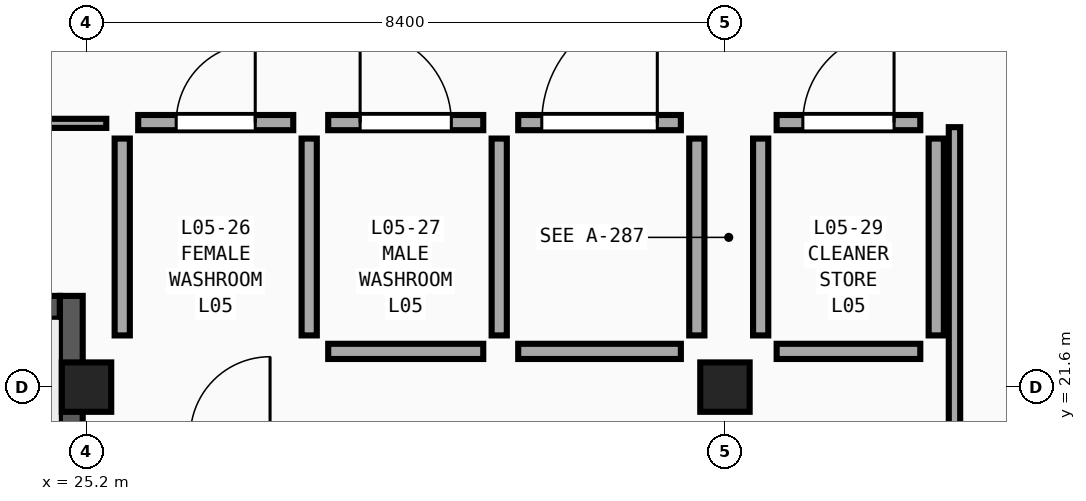
"""IFC4 building model, lengths in metres.
Left out: names, types, materials, properties, quantities, classifications, styles, units other than length and angle.
Written with IfcOpenShell. Run it as: python <this file> out.ifc"""

import sys

from ifc_helpers import new_model, si_unit, direction, frame, frame_2d, origin, origin_2d, place, context, subcontext, project, spatial, rectangle, extrude, element, fill, save


model = new_model("IFC4")
c1 = context("Model", 3, precision=1e-05, world=origin(), true_north=direction((0.0, 1.0)))
c2 = subcontext(c1, "Body", "Model", "MODEL_VIEW")
j1 = project(units=[si_unit("LENGTHUNIT", "METRE"), si_unit("PLANEANGLEUNIT", "RADIAN")], contexts=[c1])
p1 = place(None, origin())
s1 = spatial("IfcSite", under=j1, at=p1, CompositionType="ELEMENT")
p2 = place(p1, origin())
s2 = spatial("IfcBuilding", under=s1, at=p2, CompositionType="ELEMENT")
p3 = place(p2, frame((0.0, 0.0, 23.4)))
s3 = spatial("IfcBuildingStorey", under=s2, at=p3, CompositionType="ELEMENT", Elevation=23.4)
for number, where, z_axis, x_axis in (
    (1, (25.2, 21.6, 0.0), (0.0, 0.0, 1.0), (1.0, 0.0, 0.0)),
    (2, (33.6, 21.6, 0.0), (0.0, 0.0, 1.0), (1.0, 0.0, 0.0)),
):
    element("IfcColumn", number, at=place(p3, frame(where, z_axis=z_axis, x_axis=x_axis)), inside=s3, PredefinedType="COLUMN", context=c2, shape_type="SweptSolid", body=[
        extrude(rectangle(XDim=0.65, YDim=0.65, at=origin_2d()), origin(), (0.0, 0.0, 1.0), 4.5),
    ])
p4 = place(p3, frame((17.15, 22.65, 0.0), z_axis=(0.0, 0.0, 1.0), x_axis=(1.0, 0.0, 0.0)))
e3 = element("IfcWall", 3, at=p4, inside=s3, PredefinedType="SHEAR", context=c2, shape_type="SweptSolid", body=[
    extrude(rectangle(XDim=7.7, YDim=0.3, at=frame_2d((3.85, 0.0))), origin(), (0.0, 0.0, 1.0), 4.5),
])
p5 = place(p3, frame((25.0, 14.55, 0.0), z_axis=(0.0, 0.0, 1.0), x_axis=(0.0, 1.0, 0.0)))
e4 = element("IfcWall", 4, at=p5, inside=s3, PredefinedType="SHEAR", context=c2, shape_type="SweptSolid", body=[
    extrude(rectangle(XDim=8.25, YDim=0.3, at=frame_2d((4.125, 0.0))), origin(), (0.0, 0.0, 1.0), 4.5),
])
p6 = place(p3, frame((36.62, 21.03, 0.0), z_axis=(0.0, 0.0, 1.0), x_axis=(0.0, 1.0, 0.0)))
e5 = element("IfcWall", 5, at=p6, inside=s3, PredefinedType="PARTITIONING", context=c2, shape_type="SweptSolid", body=[
    extrude(rectangle(XDim=3.99, YDim=0.15, at=frame_2d((1.995, 0.0))), origin(), (0.0, 0.0, 1.0), 4.21),
])
p7 = place(p3, frame((22.24, 25.07, 0.0), z_axis=(0.0, 0.0, 1.0), x_axis=(1.0, 0.0, 0.0)))
e6 = element("IfcWall", 6, at=p7, inside=s3, PredefinedType="PARTITIONING", context=c2, shape_type="SweptSolid", body=[
    extrude(rectangle(XDim=3.22, YDim=0.12, at=frame_2d((1.61, 0.0))), origin(), (0.0, 0.0, 1.0), 4.21),
])
p8 = place(p7, frame((0.93, 0.0, 0.0)))
e7 = element("IfcOpeningElement", 7, at=p8, cuts=e6, PredefinedType="OPENING", context=c2, shape_type="SweptSolid", body=[
    extrude(rectangle(XDim=1.36, YDim=2.21, at=frame_2d((0.68, 1.105))), frame((0.0, 0.08, 0.0), z_axis=(0.0, -1.0, 0.0), x_axis=(1.0, 0.0, 0.0)), (0.0, 0.0, 1.0), 0.16),
])
p9 = place(p3, frame((30.88, 25.08, 0.0), z_axis=(0.0, 0.0, 1.0), x_axis=(1.0, 0.0, 0.0)))
e8 = element("IfcWall", 8, at=p9, inside=s3, PredefinedType="PLUMBINGWALL", context=c2, shape_type="SweptSolid", body=[
    extrude(rectangle(XDim=2.14, YDim=0.2, at=frame_2d((1.07, 0.0))), origin(), (0.0, 0.0, 1.0), 4.21),
])
p10 = place(p9, frame((0.31, 0.0, 0.0)))
e9 = element("IfcOpeningElement", 9, at=p10, cuts=e8, PredefinedType="OPENING", context=c2, shape_type="SweptSolid", body=[
    extrude(rectangle(XDim=1.52, YDim=2.37, at=frame_2d((0.76, 1.185))), frame((0.0, 0.12, 0.0), z_axis=(0.0, -1.0, 0.0), x_axis=(1.0, 0.0, 0.0)), (0.0, 0.0, 1.0), 0.24),
])
p11 = place(p3, frame((25.88, 25.08, 0.0), z_axis=(0.0, 0.0, 1.0), x_axis=(1.0, 0.0, 0.0)))
e10 = element("IfcWall", 10, at=p11, inside=s3, PredefinedType="PLUMBINGWALL", context=c2, shape_type="SweptSolid", body=[
    extrude(rectangle(XDim=2.04, YDim=0.2, at=frame_2d((1.02, 0.0))), origin(), (0.0, 0.0, 1.0), 4.21),
])
p12 = place(p11, frame((0.5, 0.0, 0.0)))
e11 = element("IfcOpeningElement", 11, at=p12, cuts=e10, PredefinedType="OPENING", context=c2, shape_type="SweptSolid", body=[
    extrude(rectangle(XDim=1.04, YDim=2.45, at=frame_2d((0.52, 1.225))), frame((0.0, 0.12, 0.0), z_axis=(0.0, -1.0, 0.0), x_axis=(1.0, 0.0, 0.0)), (0.0, 0.0, 1.0), 0.24),
])
p13 = place(p3, frame((28.38, 25.08, 0.0), z_axis=(0.0, 0.0, 1.0), x_axis=(1.0, 0.0, 0.0)))
e12 = element("IfcWall", 12, at=p13, inside=s3, PredefinedType="PLUMBINGWALL", context=c2, shape_type="SweptSolid", body=[
    extrude(rectangle(XDim=2.04, YDim=0.2, at=frame_2d((1.02, 0.0))), origin(), (0.0, 0.0, 1.0), 4.21),
])
p14 = place(p13, frame((0.42, 0.0, 0.0)))
e13 = element("IfcOpeningElement", 13, at=p14, cuts=e12, PredefinedType="OPENING", context=c2, shape_type="SweptSolid", body=[
    extrude(rectangle(XDim=1.2, YDim=2.45, at=frame_2d((0.6, 1.225))), frame((0.0, 0.12, 0.0), z_axis=(0.0, -1.0, 0.0), x_axis=(1.0, 0.0, 0.0)), (0.0, 0.0, 1.0), 0.24),
])
p15 = place(p3, frame((34.28, 25.08, 0.0), z_axis=(0.0, 0.0, 1.0), x_axis=(1.0, 0.0, 0.0)))
e14 = element("IfcWall", 14, at=p15, inside=s3, PredefinedType="PLUMBINGWALL", context=c2, shape_type="SweptSolid", body=[
    extrude(rectangle(XDim=1.89, YDim=0.2, at=frame_2d((0.945, 0.0))), origin(), (0.0, 0.0, 1.0), 4.21),
])
p16 = place(p15, frame((0.345, 0.0, 0.0)))
e15 = element("IfcOpeningElement", 15, at=p16, cuts=e14, PredefinedType="OPENING", context=c2, shape_type="SweptSolid", body=[
    extrude(rectangle(XDim=1.2, YDim=2.05, at=frame_2d((0.6, 1.025))), frame((0.0, 0.12, 0.0), z_axis=(0.0, -1.0, 0.0), x_axis=(1.0, 0.0, 0.0)), (0.0, 0.0, 1.0), 0.24),
])
for number, where, z_axis, x_axis in (
    (16, (28.13, 22.28, 0.0), (0.0, 0.0, 1.0), (0.0, 1.0, 0.0)),
    (17, (25.67, 22.28, 0.0), (0.0, 0.0, 1.0), (0.0, 1.0, 0.0)),
    (18, (30.63, 22.28, 0.0), (0.0, 0.0, 1.0), (0.0, 1.0, 0.0)),
):
    element("IfcWall", number, at=place(p3, frame(where, z_axis=z_axis, x_axis=x_axis)), inside=s3, PredefinedType="PLUMBINGWALL", context=c2, shape_type="SweptSolid", body=[
        extrude(rectangle(XDim=2.59, YDim=0.2, at=frame_2d((1.295, 0.0))), origin(), (0.0, 0.0, 1.0), 4.21),
    ])
p17 = place(p3, frame((33.23, 22.28, 0.0), z_axis=(0.0, 0.0, 1.0), x_axis=(0.0, 1.0, 0.0)))
e19 = element("IfcWall", 19, at=p17, inside=s3, PredefinedType="PLUMBINGWALL", context=c2, shape_type="SweptSolid", body=[
    extrude(rectangle(XDim=2.59, YDim=0.2, at=frame_2d((1.295, 0.0))), origin(), (0.0, 0.0, 1.0), 3.76),
])
p18 = place(p3, frame((36.38, 22.28, 0.0), z_axis=(0.0, 0.0, 1.0), x_axis=(0.0, 1.0, 0.0)))
e20 = element("IfcWall", 20, at=p18, inside=s3, PredefinedType="PLUMBINGWALL", context=c2, shape_type="SweptSolid", body=[
    extrude(rectangle(XDim=2.59, YDim=0.2, at=frame_2d((1.295, 0.0))), origin(), (0.0, 0.0, 1.0), 4.21),
])
p19 = place(p3, frame((34.07, 22.28, 0.0), z_axis=(0.0, 0.0, 1.0), x_axis=(0.0, 1.0, 0.0)))
e21 = element("IfcWall", 21, at=p19, inside=s3, PredefinedType="PLUMBINGWALL", context=c2, shape_type="SweptSolid", body=[
    extrude(rectangle(XDim=2.59, YDim=0.2, at=frame_2d((1.295, 0.0))), origin(), (0.0, 0.0, 1.0), 3.76),
])
p20 = place(p3, frame((30.88, 22.07, 0.0), z_axis=(0.0, 0.0, 1.0), x_axis=(1.0, 0.0, 0.0)))
e22 = element("IfcWall", 22, at=p20, inside=s3, PredefinedType="PLUMBINGWALL", context=c2, shape_type="SweptSolid", body=[
    extrude(rectangle(XDim=2.14, YDim=0.2, at=frame_2d((1.07, 0.0))), origin(), (0.0, 0.0, 1.0), 3.76),
])
p21 = place(p3, frame((28.38, 22.07, 0.0), z_axis=(0.0, 0.0, 1.0), x_axis=(1.0, 0.0, 0.0)))
e23 = element("IfcWall", 23, at=p21, inside=s3, PredefinedType="PLUMBINGWALL", context=c2, shape_type="SweptSolid", body=[
    extrude(rectangle(XDim=2.04, YDim=0.2, at=frame_2d((1.02, 0.0))), origin(), (0.0, 0.0, 1.0), 3.76),
])
p22 = place(p3, frame((34.28, 22.07, 0.0), z_axis=(0.0, 0.0, 1.0), x_axis=(1.0, 0.0, 0.0)))
e24 = element("IfcWall", 24, at=p22, inside=s3, PredefinedType="PLUMBINGWALL", context=c2, shape_type="SweptSolid", body=[
    extrude(rectangle(XDim=1.89, YDim=0.2, at=frame_2d((0.945, 0.0))), origin(), (0.0, 0.0, 1.0), 3.76),
])
p23 = place(p10, origin())
e25 = element("IfcDoor", 25, at=p23, inside=s3, OperationType="SINGLE_SWING_RIGHT", PredefinedType="DOOR", context=c2, shape_type="SweptSolid", body=[
    extrude(rectangle(XDim=1.52, YDim=2.37, at=frame_2d((0.76, 1.185))), frame((0.0, 0.025, 0.0), z_axis=(0.0, -1.0, 0.0), x_axis=(1.0, 0.0, 0.0)), (0.0, 0.0, 1.0), 0.05),
])
fill(e9, e25)
p24 = place(p12, origin())
e26 = element("IfcDoor", 26, at=p24, inside=s3, OperationType="SINGLE_SWING_RIGHT", PredefinedType="DOOR", context=c2, shape_type="SweptSolid", body=[
    extrude(rectangle(XDim=1.04, YDim=2.45, at=frame_2d((0.52, 1.225))), frame((0.0, 0.025, 0.0), z_axis=(0.0, -1.0, 0.0), x_axis=(1.0, 0.0, 0.0)), (0.0, 0.0, 1.0), 0.05),
])
fill(e11, e26)
p25 = place(p14, origin())
e27 = element("IfcDoor", 27, at=p25, inside=s3, OperationType="SINGLE_SWING_LEFT", PredefinedType="DOOR", context=c2, shape_type="SweptSolid", body=[
    extrude(rectangle(XDim=1.2, YDim=2.45, at=frame_2d((0.6, 1.225))), frame((0.0, 0.025, 0.0), z_axis=(0.0, -1.0, 0.0), x_axis=(1.0, 0.0, 0.0)), (0.0, 0.0, 1.0), 0.05),
])
fill(e13, e27)
p26 = place(p16, origin())
e28 = element("IfcDoor", 28, at=p26, inside=s3, OperationType="SINGLE_SWING_RIGHT", PredefinedType="DOOR", context=c2, shape_type="SweptSolid", body=[
    extrude(rectangle(XDim=1.2, YDim=2.05, at=frame_2d((0.6, 1.025))), frame((0.0, 0.025, 0.0), z_axis=(0.0, -1.0, 0.0), x_axis=(1.0, 0.0, 0.0)), (0.0, 0.0, 1.0), 0.05),
])
fill(e15, e28)
save(model, sys.argv[1])
